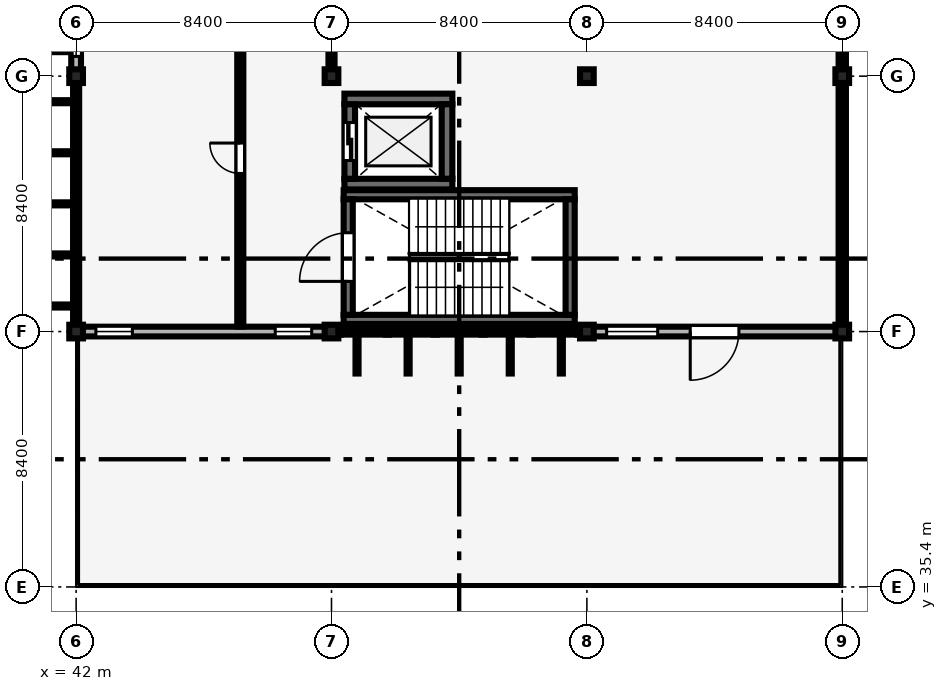
"""IFC4 building model, lengths in metres.
Left out: names, types, materials, properties, quantities, classifications, styles, units other than length and angle.
Written with IfcOpenShell. Run it as: python <this file> out.ifc"""

import sys

from ifc_helpers import new_model, si_unit, direction, frame, frame_2d, origin, origin_2d, place, context, subcontext, project, spatial, rectangle, extrude, element, fill, save


model = new_model("IFC4")
c1 = context("Model", 3, precision=1e-05, world=origin(), true_north=direction((0.0, 1.0)))
c2 = subcontext(c1, "Body", "Model", "MODEL_VIEW")
j1 = project(units=[si_unit("LENGTHUNIT", "METRE"), si_unit("PLANEANGLEUNIT", "RADIAN")], contexts=[c1])
p1 = place(None, origin())
s1 = spatial("IfcSite", under=j1, at=p1, CompositionType="ELEMENT")
p2 = place(p1, origin())
s2 = spatial("IfcBuilding", under=s1, at=p2, CompositionType="ELEMENT")
p3 = place(p2, frame((0.0, 0.0, 17.4)))
s3 = spatial("IfcBuildingStorey", under=s2, at=p3, CompositionType="ELEMENT", Elevation=17.4)
for number, where, z_axis, x_axis in (
    (1, (42.0, 43.8, 0.0), (0.0, 0.0, 1.0), (1.0, 0.0, 0.0)),
    (2, (42.0, 52.2, 0.0), (0.0, 0.0, 1.0), (1.0, 0.0, 0.0)),
    (3, (50.4, 43.8, 0.0), (0.0, 0.0, 1.0), (1.0, 0.0, 0.0)),
    (4, (50.4, 52.2, 0.0), (0.0, 0.0, 1.0), (1.0, 0.0, 0.0)),
    (5, (58.8, 43.8, 0.0), (0.0, 0.0, 1.0), (1.0, 0.0, 0.0)),
    (6, (58.8, 52.2, 0.0), (0.0, 0.0, 1.0), (1.0, 0.0, 0.0)),
    (7, (67.2, 43.8, 0.0), (0.0, 0.0, 1.0), (1.0, 0.0, 0.0)),
    (8, (67.2, 52.2, 0.0), (0.0, 0.0, 1.0), (1.0, 0.0, 0.0)),
):
    element("IfcColumn", number, at=place(p3, frame(where, z_axis=z_axis, x_axis=x_axis)), inside=s3, PredefinedType="COLUMN", context=c2, shape_type="SweptSolid", body=[
        extrude(rectangle(XDim=0.45, YDim=0.45, at=origin_2d()), origin(), (0.0, 0.0, 1.0), 4.2),
    ])
p4 = place(p3, frame((42.0, 52.4, 0.0), z_axis=(0.0, 0.0, 1.0), x_axis=(0.0, 1.0, 0.0)))
e9 = element("IfcWall", 9, at=p4, inside=s3, PredefinedType="SOLIDWALL", context=c2, shape_type="SweptSolid", body=[
    extrude(rectangle(XDim=8.0, YDim=0.32, at=frame_2d((4.0, 0.0))), origin(), (0.0, 0.0, 1.0), 3.34),
])
p5 = place(p4, frame((0.45, 0.0, 0.85)))
e10 = element("IfcOpeningElement", 10, at=p5, cuts=e9, PredefinedType="OPENING", context=c2, shape_type="SweptSolid", body=[
    extrude(rectangle(XDim=1.2, YDim=1.5, at=frame_2d((0.6, 0.75))), frame((0.0, 0.17, 0.0), z_axis=(0.0, -1.0, 0.0), x_axis=(1.0, 0.0, 0.0)), (0.0, 0.0, 1.0), 0.34),
])
p6 = place(p4, frame((6.35, 0.0, 0.85)))
e11 = element("IfcOpeningElement", 11, at=p6, cuts=e9, PredefinedType="OPENING", context=c2, shape_type="SweptSolid", body=[
    extrude(rectangle(XDim=1.2, YDim=1.5, at=frame_2d((0.6, 0.75))), frame((0.0, 0.17, 0.0), z_axis=(0.0, -1.0, 0.0), x_axis=(1.0, 0.0, 0.0)), (0.0, 0.0, 1.0), 0.34),
])
p7 = place(p3, frame((42.2, 43.8, 0.0), z_axis=(0.0, 0.0, 1.0), x_axis=(1.0, 0.0, 0.0)))
e12 = element("IfcWall", 12, at=p7, inside=s3, PredefinedType="SOLIDWALL", context=c2, shape_type="SweptSolid", body=[
    extrude(rectangle(XDim=8.0, YDim=0.32, at=frame_2d((4.0, 0.0))), origin(), (0.0, 0.0, 1.0), 3.29),
])
p8 = place(p7, frame((0.45, 0.0, 0.9)))
e13 = element("IfcOpeningElement", 13, at=p8, cuts=e12, PredefinedType="OPENING", context=c2, shape_type="SweptSolid", body=[
    extrude(rectangle(XDim=1.2, YDim=1.5, at=frame_2d((0.6, 0.75))), frame((0.0, 0.17, 0.0), z_axis=(0.0, -1.0, 0.0), x_axis=(1.0, 0.0, 0.0)), (0.0, 0.0, 1.0), 0.34),
])
p9 = place(p7, frame((6.35, 0.0, 0.9)))
e14 = element("IfcOpeningElement", 14, at=p9, cuts=e12, PredefinedType="OPENING", context=c2, shape_type="SweptSolid", body=[
    extrude(rectangle(XDim=1.2, YDim=1.8, at=frame_2d((0.6, 0.9))), frame((0.0, 0.17, 0.0), z_axis=(0.0, -1.0, 0.0), x_axis=(1.0, 0.0, 0.0)), (0.0, 0.0, 1.0), 0.34),
])
p10 = place(p3, frame((59.0, 43.8, 0.0), z_axis=(0.0, 0.0, 1.0), x_axis=(1.0, 0.0, 0.0)))
e15 = element("IfcWall", 15, at=p10, inside=s3, PredefinedType="SOLIDWALL", context=c2, shape_type="SweptSolid", body=[
    extrude(rectangle(XDim=8.0, YDim=0.32, at=frame_2d((4.0, 0.0))), origin(), (0.0, 0.0, 1.0), 3.48),
])
p11 = place(p10, frame((4.8, 0.0, 0.0), z_axis=(0.0, 0.0, 1.0), x_axis=(-1.0, 0.0, 0.0)))
e16 = element("IfcOpeningElement", 16, at=p11, cuts=e15, PredefinedType="OPENING", context=c2, shape_type="SweptSolid", body=[
    extrude(rectangle(XDim=1.6, YDim=2.3, at=frame_2d((0.8, 1.15))), frame((0.0, 0.17, 0.0), z_axis=(0.0, -1.0, 0.0), x_axis=(1.0, 0.0, 0.0)), (0.0, 0.0, 1.0), 0.34),
])
p12 = place(p10, frame((0.45, 0.0, 0.95)))
e17 = element("IfcOpeningElement", 17, at=p12, cuts=e15, PredefinedType="OPENING", context=c2, shape_type="SweptSolid", body=[
    extrude(rectangle(XDim=1.68, YDim=1.8, at=frame_2d((0.84, 0.9))), frame((0.0, 0.17, 0.0), z_axis=(0.0, -1.0, 0.0), x_axis=(1.0, 0.0, 0.0)), (0.0, 0.0, 1.0), 0.34),
])
for number, where, z_axis, x_axis in (
    (18, (67.2, 44.0, 0.0), (0.0, 0.0, 1.0), (0.0, 1.0, 0.0)),
    (19, (67.2, 52.4, 0.0), (0.0, 0.0, 1.0), (0.0, 1.0, 0.0)),
):
    element("IfcWall", number, at=place(p3, frame(where, z_axis=z_axis, x_axis=x_axis)), inside=s3, PredefinedType="SOLIDWALL", context=c2, shape_type="SweptSolid", body=[
        extrude(rectangle(XDim=8.0, YDim=0.24, at=frame_2d((4.0, 0.0))), origin(), (0.0, 0.0, 1.0), 1.15),
    ])
for number, where, z_axis, x_axis in (
    (20, (50.8, 44.2, 0.0), (0.0, 0.0, 1.0), (1.0, 0.0, 0.0)),
    (21, (50.8, 48.3, 0.0), (0.0, 0.0, 1.0), (1.0, 0.0, 0.0)),
):
    element("IfcWall", number, at=place(p3, frame(where, z_axis=z_axis, x_axis=x_axis)), inside=s3, PredefinedType="SHEAR", context=c2, shape_type="SweptSolid", body=[
        extrude(rectangle(XDim=7.6, YDim=0.3, at=frame_2d((3.8, 0.0))), origin(), (0.0, 0.0, 1.0), 4.025),
    ])
p13 = place(p3, frame((50.95, 44.35, 0.0), z_axis=(0.0, 0.0, 1.0), x_axis=(0.0, 1.0, 0.0)))
e22 = element("IfcWall", 22, at=p13, inside=s3, PredefinedType="SHEAR", context=c2, shape_type="SweptSolid", body=[
    extrude(rectangle(XDim=3.8, YDim=0.3, at=frame_2d((1.9, 0.0))), origin(), (0.0, 0.0, 1.0), 4.025),
])
p14 = place(p13, frame((1.1, 0.0, 0.0)))
e23 = element("IfcOpeningElement", 23, at=p14, cuts=e22, PredefinedType="OPENING", context=c2, shape_type="SweptSolid", body=[
    extrude(rectangle(XDim=1.6, YDim=2.2, at=frame_2d((0.8, 1.1))), frame((0.0, 0.16, 0.0), z_axis=(0.0, -1.0, 0.0), x_axis=(1.0, 0.0, 0.0)), (0.0, 0.0, 1.0), 0.32),
])
p15 = place(p3, frame((58.25, 44.35, 0.0), z_axis=(0.0, 0.0, 1.0), x_axis=(0.0, 1.0, 0.0)))
e24 = element("IfcWall", 24, at=p15, inside=s3, PredefinedType="SHEAR", context=c2, shape_type="SweptSolid", body=[
    extrude(rectangle(XDim=3.8, YDim=0.3, at=frame_2d((1.9, 0.0))), origin(), (0.0, 0.0, 1.0), 4.025),
])
for number, where, z_axis, x_axis in (
    (25, (50.825, 48.65, 0.0), (0.0, 0.0, 1.0), (1.0, 0.0, 0.0)),
    (26, (50.825, 51.45, 0.0), (0.0, 0.0, 1.0), (1.0, 0.0, 0.0)),
):
    element("IfcWall", number, at=place(p3, frame(where, z_axis=z_axis, x_axis=x_axis)), inside=s3, PredefinedType="SHEAR", context=c2, shape_type="SweptSolid", body=[
        extrude(rectangle(XDim=3.55, YDim=0.35, at=frame_2d((1.775, 0.0))), origin(), (0.0, 0.0, 1.0), 3.92),
    ])
p16 = place(p3, frame((51.0, 48.825, 0.0), z_axis=(0.0, 0.0, 1.0), x_axis=(0.0, 1.0, 0.0)))
e27 = element("IfcWall", 27, at=p16, inside=s3, PredefinedType="SHEAR", context=c2, shape_type="SweptSolid", body=[
    extrude(rectangle(XDim=2.45, YDim=0.35, at=frame_2d((1.225, 0.0))), origin(), (0.0, 0.0, 1.0), 3.92),
])
p17 = place(p16, frame((0.6, 0.0, 0.0)))
e28 = element("IfcOpeningElement", 28, at=p17, cuts=e27, PredefinedType="OPENING", context=c2, shape_type="SweptSolid", body=[
    extrude(rectangle(XDim=1.25, YDim=2.25, at=frame_2d((0.625, 1.125))), frame((0.0, 0.185, 0.0), z_axis=(0.0, -1.0, 0.0), x_axis=(1.0, 0.0, 0.0)), (0.0, 0.0, 1.0), 0.37),
])
p18 = place(p3, frame((54.2, 48.825, 0.0), z_axis=(0.0, 0.0, 1.0), x_axis=(0.0, 1.0, 0.0)))
e29 = element("IfcWall", 29, at=p18, inside=s3, PredefinedType="SHEAR", context=c2, shape_type="SweptSolid", body=[
    extrude(rectangle(XDim=2.45, YDim=0.35, at=frame_2d((1.225, 0.0))), origin(), (0.0, 0.0, 1.0), 3.92),
])
p19 = place(p3, frame((47.4, 43.965, 0.0), z_axis=(0.0, 0.0, 1.0), x_axis=(0.0, 1.0, 0.0)))
e30 = element("IfcWall", 30, at=p19, inside=s3, PredefinedType="PARTITIONING", context=c2, shape_type="SweptSolid", body=[
    extrude(rectangle(XDim=50.825, YDim=0.2, at=frame_2d((25.413, 0.0))), origin(), (0.0, 0.0, 1.0), 3.9),
])
p20 = place(p19, frame((5.035, 0.0, 0.0)))
e31 = element("IfcOpeningElement", 31, at=p20, cuts=e30, PredefinedType="OPENING", context=c2, shape_type="SweptSolid", body=[
    extrude(rectangle(XDim=1.0, YDim=2.15, at=frame_2d((0.5, 1.075))), frame((0.0, 0.11, 0.0), z_axis=(0.0, -1.0, 0.0), x_axis=(1.0, 0.0, 0.0)), (0.0, 0.0, 1.0), 0.22),
])
p21 = place(p19, frame((16.435, 0.0, 0.0)))
e32 = element("IfcOpeningElement", 32, at=p21, cuts=e30, PredefinedType="OPENING", context=c2, shape_type="SweptSolid", body=[
    extrude(rectangle(XDim=1.0, YDim=2.15, at=frame_2d((0.5, 1.075))), frame((0.0, 0.11, 0.0), z_axis=(0.0, -1.0, 0.0), x_axis=(1.0, 0.0, 0.0)), (0.0, 0.0, 1.0), 0.22),
])
p22 = place(p19, frame((24.96, 0.0, 0.0)))
e33 = element("IfcOpeningElement", 33, at=p22, cuts=e30, PredefinedType="OPENING", context=c2, shape_type="SweptSolid", body=[
    extrude(rectangle(XDim=0.95, YDim=2.2, at=frame_2d((0.475, 1.1))), frame((0.0, 0.11, 0.0), z_axis=(0.0, -1.0, 0.0), x_axis=(1.0, 0.0, 0.0)), (0.0, 0.0, 1.0), 0.22),
])
p23 = place(p19, frame((30.56, 0.0, 0.0)))
e34 = element("IfcOpeningElement", 34, at=p23, cuts=e30, PredefinedType="OPENING", context=c2, shape_type="SweptSolid", body=[
    extrude(rectangle(XDim=0.95, YDim=2.2, at=frame_2d((0.475, 1.1))), frame((0.0, 0.11, 0.0), z_axis=(0.0, -1.0, 0.0), x_axis=(1.0, 0.0, 0.0)), (0.0, 0.0, 1.0), 0.22),
])
p24 = place(p19, frame((36.16, 0.0, 0.0)))
e35 = element("IfcOpeningElement", 35, at=p24, cuts=e30, PredefinedType="OPENING", context=c2, shape_type="SweptSolid", body=[
    extrude(rectangle(XDim=0.95, YDim=2.1, at=frame_2d((0.475, 1.05))), frame((0.0, 0.11, 0.0), z_axis=(0.0, -1.0, 0.0), x_axis=(1.0, 0.0, 0.0)), (0.0, 0.0, 1.0), 0.22),
])
p25 = place(p19, frame((44.635, 0.0, 0.0)))
e36 = element("IfcOpeningElement", 36, at=p25, cuts=e30, PredefinedType="OPENING", context=c2, shape_type="SweptSolid", body=[
    extrude(rectangle(XDim=1.0, YDim=2.15, at=frame_2d((0.5, 1.075))), frame((0.0, 0.11, 0.0), z_axis=(0.0, -1.0, 0.0), x_axis=(1.0, 0.0, 0.0)), (0.0, 0.0, 1.0), 0.22),
])
p26 = place(p3, frame((50.4, 52.435, 0.0), z_axis=(0.0, 0.0, 1.0), x_axis=(0.0, 1.0, 0.0)))
e37 = element("IfcWall", 37, at=p26, inside=s3, PredefinedType="PARTITIONING", context=c2, shape_type="SweptSolid", body=[
    extrude(rectangle(XDim=7.93, YDim=0.2, at=frame_2d((3.965, 0.0))), origin(), (0.0, 0.0, 1.0), 3.14),
])
p27 = place(p26, frame((3.465, 0.0, 0.0)))
e38 = element("IfcOpeningElement", 38, at=p27, cuts=e37, PredefinedType="OPENING", context=c2, shape_type="SweptSolid", body=[
    extrude(rectangle(XDim=1.0, YDim=2.15, at=frame_2d((0.5, 1.075))), frame((0.0, 0.11, 0.0), z_axis=(0.0, -1.0, 0.0), x_axis=(1.0, 0.0, 0.0)), (0.0, 0.0, 1.0), 0.22),
])
p28 = place(p5, origin())
e39 = element("IfcWindow", 39, at=p28, inside=s3, PartitioningType="SINGLE_PANEL", PredefinedType="WINDOW", context=c2, shape_type="SweptSolid", body=[
    extrude(rectangle(XDim=1.2, YDim=1.5, at=frame_2d((0.6, 0.75))), frame((0.0, 0.03, 0.0), z_axis=(0.0, -1.0, 0.0), x_axis=(1.0, 0.0, 0.0)), (0.0, 0.0, 1.0), 0.06),
])
fill(e10, e39)
p29 = place(p8, origin())
e40 = element("IfcWindow", 40, at=p29, inside=s3, PartitioningType="SINGLE_PANEL", PredefinedType="WINDOW", context=c2, shape_type="SweptSolid", body=[
    extrude(rectangle(XDim=1.2, YDim=1.5, at=frame_2d((0.6, 0.75))), frame((0.0, 0.03, 0.0), z_axis=(0.0, -1.0, 0.0), x_axis=(1.0, 0.0, 0.0)), (0.0, 0.0, 1.0), 0.06),
])
fill(e13, e40)
p30 = place(p9, origin())
e41 = element("IfcWindow", 41, at=p30, inside=s3, PartitioningType="SINGLE_PANEL", PredefinedType="WINDOW", context=c2, shape_type="SweptSolid", body=[
    extrude(rectangle(XDim=1.2, YDim=1.8, at=frame_2d((0.6, 0.9))), frame((0.0, 0.03, 0.0), z_axis=(0.0, -1.0, 0.0), x_axis=(1.0, 0.0, 0.0)), (0.0, 0.0, 1.0), 0.06),
])
fill(e14, e41)
p31 = place(p11, origin())
e42 = element("IfcDoor", 42, at=p31, inside=s3, OperationType="DOUBLE_DOOR_SINGLE_SWING", PredefinedType="DOOR", context=c2, shape_type="SweptSolid", body=[
    extrude(rectangle(XDim=1.6, YDim=2.3, at=frame_2d((0.8, 1.15))), frame((0.0, 0.025, 0.0), z_axis=(0.0, -1.0, 0.0), x_axis=(1.0, 0.0, 0.0)), (0.0, 0.0, 1.0), 0.05),
])
fill(e16, e42)
p32 = place(p12, origin())
e43 = element("IfcWindow", 43, at=p32, inside=s3, PartitioningType="SINGLE_PANEL", PredefinedType="WINDOW", context=c2, shape_type="SweptSolid", body=[
    extrude(rectangle(XDim=1.68, YDim=1.8, at=frame_2d((0.84, 0.9))), frame((0.0, 0.03, 0.0), z_axis=(0.0, -1.0, 0.0), x_axis=(1.0, 0.0, 0.0)), (0.0, 0.0, 1.0), 0.06),
])
fill(e17, e43)
p33 = place(p14, origin())
e44 = element("IfcDoor", 44, at=p33, inside=s3, OperationType="DOUBLE_DOOR_SINGLE_SWING", PredefinedType="DOOR", context=c2, shape_type="SweptSolid", body=[
    extrude(rectangle(XDim=1.6, YDim=2.2, at=frame_2d((0.8, 1.1))), frame((0.0, 0.025, 0.0), z_axis=(0.0, -1.0, 0.0), x_axis=(1.0, 0.0, 0.0)), (0.0, 0.0, 1.0), 0.05),
])
fill(e23, e44)
p34 = place(p17, origin())
e45 = element("IfcDoor", 45, at=p34, inside=s3, OperationType="DOUBLE_DOOR_SLIDING", PredefinedType="DOOR", context=c2, shape_type="SweptSolid", body=[
    extrude(rectangle(XDim=1.25, YDim=2.25, at=frame_2d((0.625, 1.125))), frame((0.0, 0.025, 0.0), z_axis=(0.0, -1.0, 0.0), x_axis=(1.0, 0.0, 0.0)), (0.0, 0.0, 1.0), 0.05),
])
fill(e28, e45)
p35 = place(p20, origin())
e46 = element("IfcDoor", 46, at=p35, inside=s3, OperationType="SINGLE_SWING_RIGHT", PredefinedType="DOOR", context=c2, shape_type="SweptSolid", body=[
    extrude(rectangle(XDim=1.0, YDim=2.15, at=frame_2d((0.5, 1.075))), frame((0.0, 0.025, 0.0), z_axis=(0.0, -1.0, 0.0), x_axis=(1.0, 0.0, 0.0)), (0.0, 0.0, 1.0), 0.05),
])
fill(e31, e46)
save(model, sys.argv[1])
